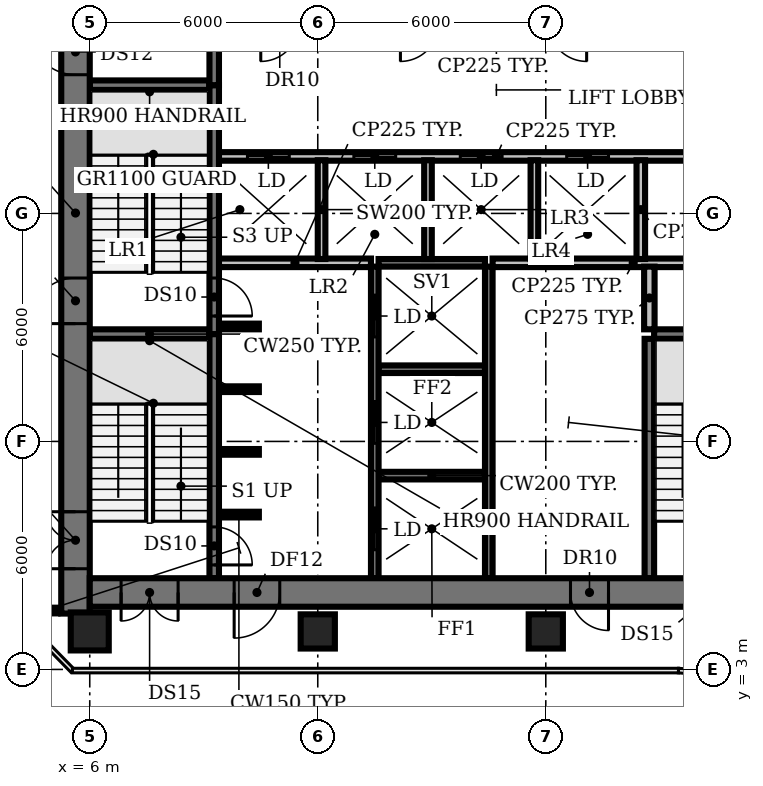
"""IFC4 building model, lengths in metres.
Left out: names, types, materials, properties, quantities, classifications, styles, units other than length and angle.
Written with IfcOpenShell. Run it as: python <this file> out.ifc"""

import sys

from ifc_helpers import new_model, si_unit, direction, frame, frame_2d, origin, origin_2d, place, context, subcontext, project, spatial, rectangle, circle, extrude, element, fill, save


model = new_model("IFC4")
c1 = context("Model", 3, precision=1e-05, world=origin(), true_north=direction((0.0, 1.0)))
c2 = subcontext(c1, "Body", "Model", "MODEL_VIEW")
j1 = project(units=[si_unit("LENGTHUNIT", "METRE"), si_unit("PLANEANGLEUNIT", "RADIAN")], contexts=[c1])
p1 = place(None, origin())
s1 = spatial("IfcSite", under=j1, at=p1, CompositionType="ELEMENT")
p2 = place(p1, origin())
s2 = spatial("IfcBuilding", under=s1, at=p2, CompositionType="ELEMENT")
p3 = place(p2, frame((0.0, 0.0, 129.8)))
s3 = spatial("IfcBuildingStorey", under=s2, at=p3, CompositionType="ELEMENT", Elevation=129.8)
p4 = place(p3, frame((6.0, 4.0, 0.0), z_axis=(0.0, 0.0, 1.0), x_axis=(1.0, 0.0, 0.0)))
e1 = element("IfcColumn", 1, at=p4, inside=s3, PredefinedType="COLUMN", context=c2, shape_type="SweptSolid", body=[
    extrude(circle(Radius=0.5, at=origin_2d()), origin(), (0.0, 0.0, 1.0), 3.85),
])
for number, where, z_axis, x_axis in (
    (2, (12.0, 4.0, 0.0), (0.0, 0.0, 1.0), (1.0, 0.0, 0.0)),
    (3, (18.0, 4.0, 0.0), (0.0, 0.0, 1.0), (1.0, 0.0, 0.0)),
):
    element("IfcColumn", number, at=place(p3, frame(where, z_axis=z_axis, x_axis=x_axis)), inside=s3, PredefinedType="COLUMN", context=c2, shape_type="SweptSolid", body=[
        extrude(rectangle(XDim=0.9, YDim=0.9, at=origin_2d()), origin(), (0.0, 0.0, 1.0), 3.85),
    ])
p5 = place(p3, frame((9.4, 7.075, 0.0), z_axis=(0.0, 0.0, 1.0), x_axis=(1.0, 0.0, 0.0)))
e4 = element("IfcWall", 4, at=p5, inside=s3, PredefinedType="SHEAR", context=c2, shape_type="SweptSolid", body=[
    extrude(rectangle(XDim=1.05, YDim=0.15, at=frame_2d((0.525, 0.0))), origin(), (0.0, 0.0, 1.0), 3.85),
])
p6 = place(p3, frame((13.6, 8.1, 0.0), z_axis=(0.0, 0.0, 1.0), x_axis=(1.0, 0.0, 0.0)))
e5 = element("IfcWall", 5, at=p6, inside=s3, PredefinedType="SHEAR", context=c2, shape_type="SweptSolid", body=[
    extrude(rectangle(XDim=2.8, YDim=0.2, at=frame_2d((1.4, 0.0))), origin(), (0.0, 0.0, 1.0), 3.85),
])
for number, where, z_axis, x_axis in (
    (6, (9.4, 8.725, 0.0), (0.0, 0.0, 1.0), (1.0, 0.0, 0.0)),
    (7, (9.4, 10.375, 0.0), (0.0, 0.0, 1.0), (1.0, 0.0, 0.0)),
):
    element("IfcWall", number, at=place(p3, frame(where, z_axis=z_axis, x_axis=x_axis)), inside=s3, PredefinedType="SHEAR", context=c2, shape_type="SweptSolid", body=[
        extrude(rectangle(XDim=1.05, YDim=0.15, at=frame_2d((0.525, 0.0))), origin(), (0.0, 0.0, 1.0), 3.85),
    ])
p7 = place(p3, frame((13.6, 10.9, 0.0), z_axis=(0.0, 0.0, 1.0), x_axis=(1.0, 0.0, 0.0)))
e8 = element("IfcWall", 8, at=p7, inside=s3, PredefinedType="SHEAR", context=c2, shape_type="SweptSolid", body=[
    extrude(rectangle(XDim=2.8, YDim=0.2, at=frame_2d((1.4, 0.0))), origin(), (0.0, 0.0, 1.0), 3.85),
])
for number, where, z_axis, x_axis in (
    (9, (6.0, 11.825, 0.0), (0.0, 0.0, 1.0), (1.0, 0.0, 0.0)),
    (10, (20.85, 11.825, 0.0), (0.0, 0.0, 1.0), (1.0, 0.0, 0.0)),
):
    element("IfcWall", number, at=place(p3, frame(where, z_axis=z_axis, x_axis=x_axis)), inside=s3, PredefinedType="SHEAR", context=c2, shape_type="SweptSolid", body=[
        extrude(rectangle(XDim=3.15, YDim=0.25, at=frame_2d((1.575, 0.0))), origin(), (0.0, 0.0, 1.0), 3.85),
    ])
p8 = place(p3, frame((9.4, 12.025, 0.0), z_axis=(0.0, 0.0, 1.0), x_axis=(1.0, 0.0, 0.0)))
e11 = element("IfcWall", 11, at=p8, inside=s3, PredefinedType="SHEAR", context=c2, shape_type="SweptSolid", body=[
    extrude(rectangle(XDim=1.05, YDim=0.15, at=frame_2d((0.525, 0.0))), origin(), (0.0, 0.0, 1.0), 3.85),
])
p9 = place(p3, frame((9.4, 13.7, 0.0), z_axis=(0.0, 0.0, 1.0), x_axis=(1.0, 0.0, 0.0)))
e12 = element("IfcWall", 12, at=p9, inside=s3, PredefinedType="PARTITIONING", context=c2, shape_type="SweptSolid", body=[
    extrude(rectangle(XDim=4.0, YDim=0.225, at=frame_2d((2.0, 0.0))), origin(), (0.0, 0.0, 1.0), 3.85),
])
p10 = place(p3, frame((13.6, 13.7, 0.0), z_axis=(0.0, 0.0, 1.0), x_axis=(1.0, 0.0, 0.0)))
e13 = element("IfcWall", 13, at=p10, inside=s3, PredefinedType="SHEAR", context=c2, shape_type="SweptSolid", body=[
    extrude(rectangle(XDim=2.8, YDim=0.2, at=frame_2d((1.4, 0.0))), origin(), (0.0, 0.0, 1.0), 3.85),
])
p11 = place(p3, frame((16.6, 13.7, 0.0), z_axis=(0.0, 0.0, 1.0), x_axis=(1.0, 0.0, 0.0)))
e14 = element("IfcWall", 14, at=p11, inside=s3, PredefinedType="PARTITIONING", context=c2, shape_type="SweptSolid", body=[
    extrude(rectangle(XDim=7.4, YDim=0.225, at=frame_2d((3.7, 0.0))), origin(), (0.0, 0.0, 1.0), 3.85),
])
p12 = place(p3, frame((9.4, 16.5, 0.0), z_axis=(0.0, 0.0, 1.0), x_axis=(1.0, 0.0, 0.0)))
e15 = element("IfcWall", 15, at=p12, inside=s3, PredefinedType="PARTITIONING", context=c2, shape_type="SweptSolid", body=[
    extrude(rectangle(XDim=14.6, YDim=0.225, at=frame_2d((7.3, 0.0))), origin(), (0.0, 0.0, 1.0), 3.85),
])
p13 = place(p12, frame((0.75, 0.0, 0.0)))
e16 = element("IfcOpeningElement", 16, at=p13, cuts=e15, PredefinedType="OPENING", context=c2, shape_type="SweptSolid", body=[
    extrude(rectangle(XDim=1.1, YDim=2.1, at=frame_2d((0.55, 1.05))), frame((0.0, 0.123, 0.0), z_axis=(0.0, -1.0, 0.0), x_axis=(1.0, 0.0, 0.0)), (0.0, 0.0, 1.0), 0.245),
])
p14 = place(p12, frame((3.55, 0.0, 0.0)))
e17 = element("IfcOpeningElement", 17, at=p14, cuts=e15, PredefinedType="OPENING", context=c2, shape_type="SweptSolid", body=[
    extrude(rectangle(XDim=1.1, YDim=2.1, at=frame_2d((0.55, 1.05))), frame((0.0, 0.123, 0.0), z_axis=(0.0, -1.0, 0.0), x_axis=(1.0, 0.0, 0.0)), (0.0, 0.0, 1.0), 0.245),
])
p15 = place(p12, frame((6.35, 0.0, 0.0)))
e18 = element("IfcOpeningElement", 18, at=p15, cuts=e15, PredefinedType="OPENING", context=c2, shape_type="SweptSolid", body=[
    extrude(rectangle(XDim=1.1, YDim=2.1, at=frame_2d((0.55, 1.05))), frame((0.0, 0.123, 0.0), z_axis=(0.0, -1.0, 0.0), x_axis=(1.0, 0.0, 0.0)), (0.0, 0.0, 1.0), 0.245),
])
p16 = place(p12, frame((9.15, 0.0, 0.0)))
e19 = element("IfcOpeningElement", 19, at=p16, cuts=e15, PredefinedType="OPENING", context=c2, shape_type="SweptSolid", body=[
    extrude(rectangle(XDim=1.1, YDim=2.1, at=frame_2d((0.55, 1.05))), frame((0.0, 0.123, 0.0), z_axis=(0.0, -1.0, 0.0), x_axis=(1.0, 0.0, 0.0)), (0.0, 0.0, 1.0), 0.245),
])
p17 = place(p12, frame((12.4, 0.0, 0.0)))
e20 = element("IfcOpeningElement", 20, at=p17, cuts=e15, PredefinedType="OPENING", context=c2, shape_type="SweptSolid", body=[
    extrude(rectangle(XDim=1.0, YDim=2.1, at=frame_2d((0.5, 1.05))), frame((0.0, 0.123, 0.0), z_axis=(0.0, -1.0, 0.0), x_axis=(1.0, 0.0, 0.0)), (0.0, 0.0, 1.0), 0.245),
])
p18 = place(p3, frame((6.0, 18.375, 0.0), z_axis=(0.0, 0.0, 1.0), x_axis=(1.0, 0.0, 0.0)))
e21 = element("IfcWall", 21, at=p18, inside=s3, PredefinedType="SHEAR", context=c2, shape_type="SweptSolid", body=[
    extrude(rectangle(XDim=3.15, YDim=0.25, at=frame_2d((1.575, 0.0))), origin(), (0.0, 0.0, 1.0), 3.85),
])
p19 = place(p3, frame((9.275, 11.825, 0.0), z_axis=(0.0, 0.0, 1.0), x_axis=(0.0, -1.0, 0.0)))
e22 = element("IfcWall", 22, at=p19, inside=s3, PredefinedType="SHEAR", context=c2, shape_type="SweptSolid", body=[
    extrude(rectangle(XDim=6.425, YDim=0.25, at=frame_2d((3.212, 0.0))), origin(), (0.0, 0.0, 1.0), 3.85),
])
p20 = place(p19, frame((5.075, 0.0, 0.0)))
e23 = element("IfcOpeningElement", 23, at=p20, cuts=e22, PredefinedType="OPENING", context=c2, shape_type="SweptSolid", body=[
    extrude(rectangle(XDim=1.0, YDim=2.1, at=frame_2d((0.5, 1.05))), frame((0.0, 0.135, 0.0), z_axis=(0.0, -1.0, 0.0), x_axis=(1.0, 0.0, 0.0)), (0.0, 0.0, 1.0), 0.27),
])
p21 = place(p3, frame((9.275, 18.375, 0.0), z_axis=(0.0, 0.0, 1.0), x_axis=(0.0, -1.0, 0.0)))
e24 = element("IfcWall", 24, at=p21, inside=s3, PredefinedType="SHEAR", context=c2, shape_type="SweptSolid", body=[
    extrude(rectangle(XDim=6.55, YDim=0.25, at=frame_2d((3.275, 0.0))), origin(), (0.0, 0.0, 1.0), 3.85),
])
p22 = place(p21, frame((5.075, 0.0, 0.0)))
e25 = element("IfcOpeningElement", 25, at=p22, cuts=e24, PredefinedType="OPENING", context=c2, shape_type="SweptSolid", body=[
    extrude(rectangle(XDim=1.0, YDim=2.1, at=frame_2d((0.5, 1.05))), frame((0.0, 0.135, 0.0), z_axis=(0.0, -1.0, 0.0), x_axis=(1.0, 0.0, 0.0)), (0.0, 0.0, 1.0), 0.27),
])
p23 = place(p3, frame((9.275, 18.375, 0.0), z_axis=(0.0, 0.0, 1.0), x_axis=(0.0, 1.0, 0.0)))
e26 = element("IfcWall", 26, at=p23, inside=s3, PredefinedType="SHEAR", context=c2, shape_type="SweptSolid", body=[
    extrude(rectangle(XDim=6.425, YDim=0.25, at=frame_2d((3.212, 0.0))), origin(), (0.0, 0.0, 1.0), 3.85),
])
p24 = place(p3, frame((12.1, 13.8, 0.0), z_axis=(0.0, 0.0, 1.0), x_axis=(0.0, 1.0, 0.0)))
e27 = element("IfcWall", 27, at=p24, inside=s3, PredefinedType="SOLIDWALL", context=c2, shape_type="SweptSolid", body=[
    extrude(rectangle(XDim=2.6, YDim=0.2, at=frame_2d((1.3, 0.0))), origin(), (0.0, 0.0, 1.0), 3.85),
])
p25 = place(p3, frame((13.5, 5.4, 0.0), z_axis=(0.0, 0.0, 1.0), x_axis=(0.0, 1.0, 0.0)))
e28 = element("IfcWall", 28, at=p25, inside=s3, PredefinedType="SHEAR", context=c2, shape_type="SweptSolid", body=[
    extrude(rectangle(XDim=8.2, YDim=0.2, at=frame_2d((4.1, 0.0))), origin(), (0.0, 0.0, 1.0), 3.85),
])
p26 = place(p25, frame((0.75, 0.0, 0.0)))
e29 = element("IfcOpeningElement", 29, at=p26, cuts=e28, PredefinedType="OPENING", context=c2, shape_type="SweptSolid", body=[
    extrude(rectangle(XDim=1.1, YDim=2.1, at=frame_2d((0.55, 1.05))), frame((0.0, 0.11, 0.0), z_axis=(0.0, -1.0, 0.0), x_axis=(1.0, 0.0, 0.0)), (0.0, 0.0, 1.0), 0.22),
])
p27 = place(p25, frame((3.55, 0.0, 0.0)))
e30 = element("IfcOpeningElement", 30, at=p27, cuts=e28, PredefinedType="OPENING", context=c2, shape_type="SweptSolid", body=[
    extrude(rectangle(XDim=1.1, YDim=2.1, at=frame_2d((0.55, 1.05))), frame((0.0, 0.11, 0.0), z_axis=(0.0, -1.0, 0.0), x_axis=(1.0, 0.0, 0.0)), (0.0, 0.0, 1.0), 0.22),
])
p28 = place(p25, frame((6.35, 0.0, 0.0)))
e31 = element("IfcOpeningElement", 31, at=p28, cuts=e28, PredefinedType="OPENING", context=c2, shape_type="SweptSolid", body=[
    extrude(rectangle(XDim=1.1, YDim=2.1, at=frame_2d((0.55, 1.05))), frame((0.0, 0.11, 0.0), z_axis=(0.0, -1.0, 0.0), x_axis=(1.0, 0.0, 0.0)), (0.0, 0.0, 1.0), 0.22),
])
p29 = place(p3, frame((14.9, 13.8, 0.0), z_axis=(0.0, 0.0, 1.0), x_axis=(0.0, 1.0, 0.0)))
e32 = element("IfcWall", 32, at=p29, inside=s3, PredefinedType="SOLIDWALL", context=c2, shape_type="SweptSolid", body=[
    extrude(rectangle(XDim=2.6, YDim=0.2, at=frame_2d((1.3, 0.0))), origin(), (0.0, 0.0, 1.0), 3.85),
])
p30 = place(p3, frame((16.5, 5.4, 0.0), z_axis=(0.0, 0.0, 1.0), x_axis=(0.0, 1.0, 0.0)))
e33 = element("IfcWall", 33, at=p30, inside=s3, PredefinedType="SHEAR", context=c2, shape_type="SweptSolid", body=[
    extrude(rectangle(XDim=8.2, YDim=0.2, at=frame_2d((4.1, 0.0))), origin(), (0.0, 0.0, 1.0), 3.85),
])
p31 = place(p3, frame((17.7, 13.8, 0.0), z_axis=(0.0, 0.0, 1.0), x_axis=(0.0, 1.0, 0.0)))
e34 = element("IfcWall", 34, at=p31, inside=s3, PredefinedType="SOLIDWALL", context=c2, shape_type="SweptSolid", body=[
    extrude(rectangle(XDim=2.6, YDim=0.2, at=frame_2d((1.3, 0.0))), origin(), (0.0, 0.0, 1.0), 3.85),
])
p32 = place(p3, frame((20.5, 13.8, 0.0), z_axis=(0.0, 0.0, 1.0), x_axis=(0.0, 1.0, 0.0)))
e35 = element("IfcWall", 35, at=p32, inside=s3, PredefinedType="PARTITIONING", context=c2, shape_type="SweptSolid", body=[
    extrude(rectangle(XDim=2.6, YDim=0.225, at=frame_2d((1.3, 0.0))), origin(), (0.0, 0.0, 1.0), 3.85),
])
p33 = place(p3, frame((20.725, 5.4, 0.0), z_axis=(0.0, 0.0, 1.0), x_axis=(0.0, 1.0, 0.0)))
e36 = element("IfcWall", 36, at=p33, inside=s3, PredefinedType="SHEAR", context=c2, shape_type="SweptSolid", body=[
    extrude(rectangle(XDim=6.3, YDim=0.25, at=frame_2d((3.15, 0.0))), origin(), (0.0, 0.0, 1.0), 3.85),
])
p34 = place(p3, frame((20.725, 11.95, 0.0), z_axis=(0.0, 0.0, 1.0), x_axis=(0.0, 1.0, 0.0)))
e37 = element("IfcWall", 37, at=p34, inside=s3, PredefinedType="PARTITIONING", context=c2, shape_type="SweptSolid", body=[
    extrude(rectangle(XDim=1.65, YDim=0.275, at=frame_2d((0.825, 0.0))), origin(), (0.0, 0.0, 1.0), 3.85),
])
p35 = place(p3, frame((5.625, 4.47, 0.0), z_axis=(0.0, 0.0, 1.0), x_axis=(0.0, 1.0, 0.0)))
e38 = element("IfcWall", 38, at=p35, inside=s3, PredefinedType="SHEAR", context=c2, shape_type="SweptSolid", body=[
    extrude(rectangle(XDim=21.08, YDim=0.75, at=frame_2d((10.54, 0.0))), origin(), (0.0, 0.0, 1.0), 3.85),
])
p36 = place(p35, frame((1.18, 0.0, 0.0)))
e39 = element("IfcOpeningElement", 39, at=p36, cuts=e38, PredefinedType="OPENING", context=c2, shape_type="SweptSolid", body=[
    extrude(rectangle(XDim=1.5, YDim=2.1, at=frame_2d((0.75, 1.05))), frame((0.0, 0.385, 0.0), z_axis=(0.0, -1.0, 0.0), x_axis=(1.0, 0.0, 0.0)), (0.0, 0.0, 1.0), 0.77),
])
p37 = place(p35, frame((7.63, 0.0, 0.0)))
e40 = element("IfcOpeningElement", 40, at=p37, cuts=e38, PredefinedType="OPENING", context=c2, shape_type="SweptSolid", body=[
    extrude(rectangle(XDim=1.2, YDim=2.1, at=frame_2d((0.6, 1.05))), frame((0.0, 0.385, 0.0), z_axis=(0.0, -1.0, 0.0), x_axis=(1.0, 0.0, 0.0)), (0.0, 0.0, 1.0), 0.77),
])
p38 = place(p35, frame((14.18, 0.0, 0.0)))
e41 = element("IfcOpeningElement", 41, at=p38, cuts=e38, PredefinedType="OPENING", context=c2, shape_type="SweptSolid", body=[
    extrude(rectangle(XDim=1.2, YDim=2.1, at=frame_2d((0.6, 1.05))), frame((0.0, 0.385, 0.0), z_axis=(0.0, -1.0, 0.0), x_axis=(1.0, 0.0, 0.0)), (0.0, 0.0, 1.0), 0.77),
])
p39 = place(p3, frame((24.0, 5.025, 0.0), z_axis=(0.0, 0.0, 1.0), x_axis=(-1.0, 0.0, 0.0)))
e42 = element("IfcWall", 42, at=p39, inside=s3, PredefinedType="SHEAR", context=c2, shape_type="SweptSolid", body=[
    extrude(rectangle(XDim=18.0, YDim=0.75, at=frame_2d((9.0, 0.0))), origin(), (0.0, 0.0, 1.0), 3.85),
])
p40 = place(p39, frame((0.825, 0.0, 0.0)))
e43 = element("IfcOpeningElement", 43, at=p40, cuts=e42, PredefinedType="OPENING", context=c2, shape_type="SweptSolid", body=[
    extrude(rectangle(XDim=1.5, YDim=2.1, at=frame_2d((0.75, 1.05))), frame((0.0, 0.385, 0.0), z_axis=(0.0, -1.0, 0.0), x_axis=(1.0, 0.0, 0.0)), (0.0, 0.0, 1.0), 0.77),
])
p41 = place(p39, frame((15.675, 0.0, 0.0)))
e44 = element("IfcOpeningElement", 44, at=p41, cuts=e42, PredefinedType="OPENING", context=c2, shape_type="SweptSolid", body=[
    extrude(rectangle(XDim=1.5, YDim=2.1, at=frame_2d((0.75, 1.05))), frame((0.0, 0.385, 0.0), z_axis=(0.0, -1.0, 0.0), x_axis=(1.0, 0.0, 0.0)), (0.0, 0.0, 1.0), 0.77),
])
p42 = place(p39, frame((13.0, 0.0, 0.0)))
e45 = element("IfcOpeningElement", 45, at=p42, cuts=e42, PredefinedType="OPENING", context=c2, shape_type="SweptSolid", body=[
    extrude(rectangle(XDim=1.2, YDim=2.1, at=frame_2d((0.6, 1.05))), frame((0.0, 0.385, 0.0), z_axis=(0.0, -1.0, 0.0), x_axis=(1.0, 0.0, 0.0)), (0.0, 0.0, 1.0), 0.77),
])
p43 = place(p39, frame((4.35, 0.0, 0.0)))
e46 = element("IfcOpeningElement", 46, at=p43, cuts=e42, PredefinedType="OPENING", context=c2, shape_type="SweptSolid", body=[
    extrude(rectangle(XDim=1.0, YDim=2.1, at=frame_2d((0.5, 1.05))), frame((0.0, 0.385, 0.0), z_axis=(0.0, -1.0, 0.0), x_axis=(1.0, 0.0, 0.0)), (0.0, 0.0, 1.0), 0.77),
])
p44 = place(p3, frame((4.07, 4.55, 0.0), z_axis=(0.0, 0.0, 1.0), x_axis=(1.0, 0.0, 0.0)))
e47 = element("IfcWall", 47, at=p44, inside=s3, PredefinedType="PARTITIONING", context=c2, shape_type="SweptSolid", body=[
    extrude(rectangle(XDim=1.08, YDim=0.15, at=frame_2d((0.54, 0.0))), origin(), (0.0, 0.0, 1.0), 2.83),
])
p45 = place(p13, origin())
e48 = element("IfcDoor", 48, at=p45, inside=s3, OperationType="DOUBLE_DOOR_SLIDING", PredefinedType="DOOR", context=c2, shape_type="SweptSolid", body=[
    extrude(rectangle(XDim=1.1, YDim=2.1, at=frame_2d((0.55, 1.05))), frame((0.0, 0.025, 0.0), z_axis=(0.0, -1.0, 0.0), x_axis=(1.0, 0.0, 0.0)), (0.0, 0.0, 1.0), 0.05),
])
fill(e16, e48)
p46 = place(p14, origin())
e49 = element("IfcDoor", 49, at=p46, inside=s3, OperationType="DOUBLE_DOOR_SLIDING", PredefinedType="DOOR", context=c2, shape_type="SweptSolid", body=[
    extrude(rectangle(XDim=1.1, YDim=2.1, at=frame_2d((0.55, 1.05))), frame((0.0, 0.025, 0.0), z_axis=(0.0, -1.0, 0.0), x_axis=(1.0, 0.0, 0.0)), (0.0, 0.0, 1.0), 0.05),
])
fill(e17, e49)
p47 = place(p15, origin())
e50 = element("IfcDoor", 50, at=p47, inside=s3, OperationType="DOUBLE_DOOR_SLIDING", PredefinedType="DOOR", context=c2, shape_type="SweptSolid", body=[
    extrude(rectangle(XDim=1.1, YDim=2.1, at=frame_2d((0.55, 1.05))), frame((0.0, 0.025, 0.0), z_axis=(0.0, -1.0, 0.0), x_axis=(1.0, 0.0, 0.0)), (0.0, 0.0, 1.0), 0.05),
])
fill(e18, e50)
p48 = place(p16, origin())
e51 = element("IfcDoor", 51, at=p48, inside=s3, OperationType="DOUBLE_DOOR_SLIDING", PredefinedType="DOOR", context=c2, shape_type="SweptSolid", body=[
    extrude(rectangle(XDim=1.1, YDim=2.1, at=frame_2d((0.55, 1.05))), frame((0.0, 0.025, 0.0), z_axis=(0.0, -1.0, 0.0), x_axis=(1.0, 0.0, 0.0)), (0.0, 0.0, 1.0), 0.05),
])
fill(e19, e51)
p49 = place(p20, origin())
e52 = element("IfcDoor", 52, at=p49, inside=s3, OperationType="SINGLE_SWING_RIGHT", PredefinedType="DOOR", context=c2, shape_type="SweptSolid", body=[
    extrude(rectangle(XDim=1.0, YDim=2.1, at=frame_2d((0.5, 1.05))), frame((0.0, 0.025, 0.0), z_axis=(0.0, -1.0, 0.0), x_axis=(1.0, 0.0, 0.0)), (0.0, 0.0, 1.0), 0.05),
])
fill(e23, e52)
p50 = place(p22, origin())
e53 = element("IfcDoor", 53, at=p50, inside=s3, OperationType="SINGLE_SWING_RIGHT", PredefinedType="DOOR", context=c2, shape_type="SweptSolid", body=[
    extrude(rectangle(XDim=1.0, YDim=2.1, at=frame_2d((0.5, 1.05))), frame((0.0, 0.025, 0.0), z_axis=(0.0, -1.0, 0.0), x_axis=(1.0, 0.0, 0.0)), (0.0, 0.0, 1.0), 0.05),
])
fill(e25, e53)
p51 = place(p26, origin())
e54 = element("IfcDoor", 54, at=p51, inside=s3, OperationType="DOUBLE_DOOR_SLIDING", PredefinedType="DOOR", context=c2, shape_type="SweptSolid", body=[
    extrude(rectangle(XDim=1.1, YDim=2.1, at=frame_2d((0.55, 1.05))), frame((0.0, 0.025, 0.0), z_axis=(0.0, -1.0, 0.0), x_axis=(1.0, 0.0, 0.0)), (0.0, 0.0, 1.0), 0.05),
])
fill(e29, e54)
p52 = place(p27, origin())
e55 = element("IfcDoor", 55, at=p52, inside=s3, OperationType="DOUBLE_DOOR_SLIDING", PredefinedType="DOOR", context=c2, shape_type="SweptSolid", body=[
    extrude(rectangle(XDim=1.1, YDim=2.1, at=frame_2d((0.55, 1.05))), frame((0.0, 0.025, 0.0), z_axis=(0.0, -1.0, 0.0), x_axis=(1.0, 0.0, 0.0)), (0.0, 0.0, 1.0), 0.05),
])
fill(e30, e55)
p53 = place(p28, origin())
e56 = element("IfcDoor", 56, at=p53, inside=s3, OperationType="DOUBLE_DOOR_SLIDING", PredefinedType="DOOR", context=c2, shape_type="SweptSolid", body=[
    extrude(rectangle(XDim=1.1, YDim=2.1, at=frame_2d((0.55, 1.05))), frame((0.0, 0.025, 0.0), z_axis=(0.0, -1.0, 0.0), x_axis=(1.0, 0.0, 0.0)), (0.0, 0.0, 1.0), 0.05),
])
fill(e31, e56)
p54 = place(p36, origin())
e57 = element("IfcDoor", 57, at=p54, inside=s3, OperationType="DOUBLE_DOOR_SINGLE_SWING", PredefinedType="DOOR", context=c2, shape_type="SweptSolid", body=[
    extrude(rectangle(XDim=1.5, YDim=2.1, at=frame_2d((0.75, 1.05))), frame((0.0, 0.025, 0.0), z_axis=(0.0, -1.0, 0.0), x_axis=(1.0, 0.0, 0.0)), (0.0, 0.0, 1.0), 0.05),
])
fill(e39, e57)
p55 = place(p37, origin())
e58 = element("IfcDoor", 58, at=p55, inside=s3, OperationType="SINGLE_SWING_LEFT", PredefinedType="DOOR", context=c2, shape_type="SweptSolid", body=[
    extrude(rectangle(XDim=1.2, YDim=2.1, at=frame_2d((0.6, 1.05))), frame((0.0, 0.025, 0.0), z_axis=(0.0, -1.0, 0.0), x_axis=(1.0, 0.0, 0.0)), (0.0, 0.0, 1.0), 0.05),
])
fill(e40, e58)
p56 = place(p38, origin())
e59 = element("IfcDoor", 59, at=p56, inside=s3, OperationType="SINGLE_SWING_RIGHT", PredefinedType="DOOR", context=c2, shape_type="SweptSolid", body=[
    extrude(rectangle(XDim=1.2, YDim=2.1, at=frame_2d((0.6, 1.05))), frame((0.0, 0.025, 0.0), z_axis=(0.0, -1.0, 0.0), x_axis=(1.0, 0.0, 0.0)), (0.0, 0.0, 1.0), 0.05),
])
fill(e41, e59)
p57 = place(p41, origin())
e60 = element("IfcDoor", 60, at=p57, inside=s3, OperationType="DOUBLE_DOOR_SINGLE_SWING", PredefinedType="DOOR", context=c2, shape_type="SweptSolid", body=[
    extrude(rectangle(XDim=1.5, YDim=2.1, at=frame_2d((0.75, 1.05))), frame((0.0, 0.025, 0.0), z_axis=(0.0, -1.0, 0.0), x_axis=(1.0, 0.0, 0.0)), (0.0, 0.0, 1.0), 0.05),
])
fill(e44, e60)
p58 = place(p42, origin())
e61 = element("IfcDoor", 61, at=p58, inside=s3, OperationType="SINGLE_SWING_RIGHT", PredefinedType="DOOR", context=c2, shape_type="SweptSolid", body=[
    extrude(rectangle(XDim=1.2, YDim=2.1, at=frame_2d((0.6, 1.05))), frame((0.0, 0.025, 0.0), z_axis=(0.0, -1.0, 0.0), x_axis=(1.0, 0.0, 0.0)), (0.0, 0.0, 1.0), 0.05),
])
fill(e45, e61)
p59 = place(p43, origin())
e62 = element("IfcDoor", 62, at=p59, inside=s3, OperationType="SINGLE_SWING_LEFT", PredefinedType="DOOR", context=c2, shape_type="SweptSolid", body=[
    extrude(rectangle(XDim=1.0, YDim=2.1, at=frame_2d((0.5, 1.05))), frame((0.0, -0.315, 0.0), z_axis=(0.0, -1.0, 0.0), x_axis=(1.0, 0.0, 0.0)), (0.0, 0.0, 1.0), 0.05),
])
fill(e46, e62)
save(model, sys.argv[1])
